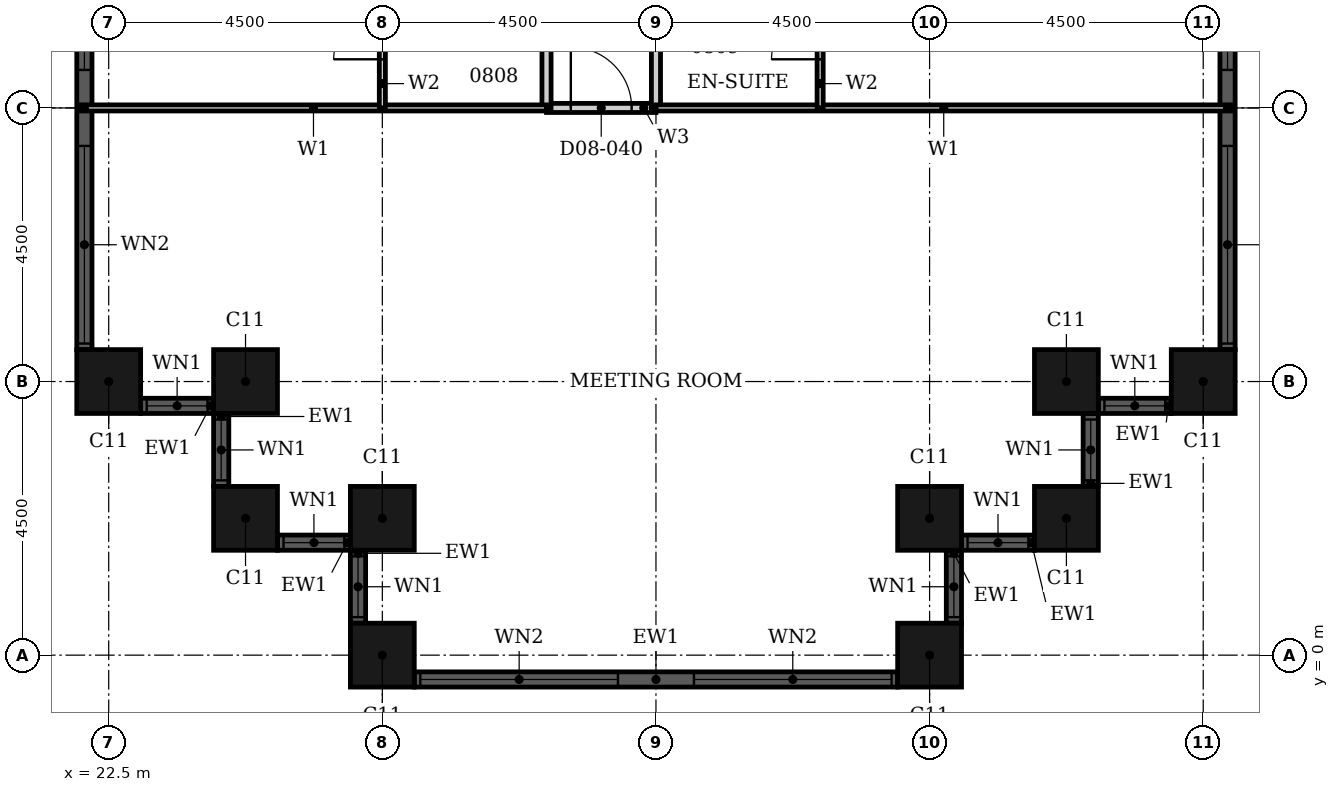
"""IFC4 building model, lengths in metres.
Left out: names, types, materials, properties, quantities, classifications, styles, units other than length and angle.
Written with IfcOpenShell. Run it as: python <this file> out.ifc"""

import sys

from ifc_helpers import new_model, si_unit, direction, frame, frame_2d, origin, origin_2d, place, context, subcontext, project, spatial, rectangle, hollow_rectangle, extrude, element, fill, save


model = new_model("IFC4")
c1 = context("Model", 3, precision=1e-05, world=origin(), true_north=direction((0.0, 1.0)))
c2 = subcontext(c1, "Body", "Model", "MODEL_VIEW")
j1 = project(units=[si_unit("LENGTHUNIT", "METRE"), si_unit("PLANEANGLEUNIT", "RADIAN")], contexts=[c1])
p1 = place(None, origin())
s1 = spatial("IfcSite", under=j1, at=p1, CompositionType="ELEMENT")
p2 = place(p1, origin())
s2 = spatial("IfcBuilding", under=s1, at=p2, CompositionType="ELEMENT")
p3 = place(p2, frame((0.0, 0.0, 40.8)))
s3 = spatial("IfcBuildingStorey", under=s2, at=p3, CompositionType="ELEMENT", Elevation=40.8)
for number, where, z_axis, x_axis in (
    (1, (22.5, 4.5, 0.0), (0.0, 0.0, 1.0), (1.0, 0.0, 0.0)),
    (2, (24.75, 4.5, 0.0), (0.0, 0.0, 1.0), (1.0, 0.0, 0.0)),
    (3, (24.75, 2.25, 0.0), (0.0, 0.0, 1.0), (1.0, 0.0, 0.0)),
    (4, (27.0, 2.25, 0.0), (0.0, 0.0, 1.0), (1.0, 0.0, 0.0)),
    (5, (27.0, 0.0, 0.0), (0.0, 0.0, 1.0), (1.0, 0.0, 0.0)),
    (6, (36.0, 0.0, 0.0), (0.0, 0.0, 1.0), (1.0, 0.0, 0.0)),
    (7, (36.0, 2.25, 0.0), (0.0, 0.0, 1.0), (1.0, 0.0, 0.0)),
    (8, (38.25, 2.25, 0.0), (0.0, 0.0, 1.0), (1.0, 0.0, 0.0)),
    (9, (38.25, 4.5, 0.0), (0.0, 0.0, 1.0), (1.0, 0.0, 0.0)),
    (10, (40.5, 4.5, 0.0), (0.0, 0.0, 1.0), (1.0, 0.0, 0.0)),
):
    element("IfcColumn", number, at=place(p3, frame(where, z_axis=z_axis, x_axis=x_axis)), inside=s3, PredefinedType="COLUMN", context=c2, shape_type="SweptSolid", body=[
        extrude(hollow_rectangle(XDim=1.05, YDim=1.05, WallThickness=0.034, at=origin_2d()), origin(), (0.0, 0.0, 1.0), 3.6),
    ])
p4 = place(p3, frame((23.025, 4.1, 0.0), z_axis=(0.0, 0.0, 1.0), x_axis=(1.0, 0.0, 0.0)))
e11 = element("IfcWall", 11, at=p4, inside=s3, PredefinedType="SOLIDWALL", context=c2, shape_type="SweptSolid", body=[
    extrude(rectangle(XDim=1.2, YDim=0.25, at=frame_2d((0.6, 0.0))), origin(), (0.0, 0.0, 1.0), 3.6),
])
p5 = place(p4, frame((0.1, 0.0, 0.9)))
e12 = element("IfcOpeningElement", 12, at=p5, cuts=e11, PredefinedType="OPENING", context=c2, shape_type="SweptSolid", body=[
    extrude(rectangle(XDim=1.0, YDim=2.08, at=frame_2d((0.5, 1.04))), frame((0.0, 0.135, 0.0), z_axis=(0.0, -1.0, 0.0), x_axis=(1.0, 0.0, 0.0)), (0.0, 0.0, 1.0), 0.27),
])
p6 = place(p3, frame((24.35, 3.975, 0.0), z_axis=(0.0, 0.0, 1.0), x_axis=(0.0, -1.0, 0.0)))
e13 = element("IfcWall", 13, at=p6, inside=s3, PredefinedType="SOLIDWALL", context=c2, shape_type="SweptSolid", body=[
    extrude(rectangle(XDim=1.2, YDim=0.25, at=frame_2d((0.6, 0.0))), origin(), (0.0, 0.0, 1.0), 3.6),
])
p7 = place(p6, frame((0.1, 0.0, 0.9)))
e14 = element("IfcOpeningElement", 14, at=p7, cuts=e13, PredefinedType="OPENING", context=c2, shape_type="SweptSolid", body=[
    extrude(rectangle(XDim=1.0, YDim=2.08, at=frame_2d((0.5, 1.04))), frame((0.0, 0.135, 0.0), z_axis=(0.0, -1.0, 0.0), x_axis=(1.0, 0.0, 0.0)), (0.0, 0.0, 1.0), 0.27),
])
p8 = place(p3, frame((25.275, 1.85, 0.0), z_axis=(0.0, 0.0, 1.0), x_axis=(1.0, 0.0, 0.0)))
e15 = element("IfcWall", 15, at=p8, inside=s3, PredefinedType="SOLIDWALL", context=c2, shape_type="SweptSolid", body=[
    extrude(rectangle(XDim=1.2, YDim=0.25, at=frame_2d((0.6, 0.0))), origin(), (0.0, 0.0, 1.0), 3.6),
])
p9 = place(p8, frame((0.1, 0.0, 0.9)))
e16 = element("IfcOpeningElement", 16, at=p9, cuts=e15, PredefinedType="OPENING", context=c2, shape_type="SweptSolid", body=[
    extrude(rectangle(XDim=1.0, YDim=2.08, at=frame_2d((0.5, 1.04))), frame((0.0, 0.135, 0.0), z_axis=(0.0, -1.0, 0.0), x_axis=(1.0, 0.0, 0.0)), (0.0, 0.0, 1.0), 0.27),
])
p10 = place(p3, frame((26.6, 1.725, 0.0), z_axis=(0.0, 0.0, 1.0), x_axis=(0.0, -1.0, 0.0)))
e17 = element("IfcWall", 17, at=p10, inside=s3, PredefinedType="SOLIDWALL", context=c2, shape_type="SweptSolid", body=[
    extrude(rectangle(XDim=1.2, YDim=0.25, at=frame_2d((0.6, 0.0))), origin(), (0.0, 0.0, 1.0), 3.6),
])
p11 = place(p10, frame((0.1, 0.0, 0.9)))
e18 = element("IfcOpeningElement", 18, at=p11, cuts=e17, PredefinedType="OPENING", context=c2, shape_type="SweptSolid", body=[
    extrude(rectangle(XDim=1.0, YDim=2.08, at=frame_2d((0.5, 1.04))), frame((0.0, 0.135, 0.0), z_axis=(0.0, -1.0, 0.0), x_axis=(1.0, 0.0, 0.0)), (0.0, 0.0, 1.0), 0.27),
])
p12 = place(p3, frame((27.525, -0.4, 0.0), z_axis=(0.0, 0.0, 1.0), x_axis=(1.0, 0.0, 0.0)))
e19 = element("IfcWall", 19, at=p12, inside=s3, PredefinedType="SOLIDWALL", context=c2, shape_type="SweptSolid", body=[
    extrude(rectangle(XDim=7.95, YDim=0.25, at=frame_2d((3.975, 0.0))), origin(), (0.0, 0.0, 1.0), 3.6),
])
p13 = place(p12, frame((0.1, 0.0, 0.9)))
e20 = element("IfcOpeningElement", 20, at=p13, cuts=e19, PredefinedType="OPENING", context=c2, shape_type="SweptSolid", body=[
    extrude(rectangle(XDim=3.25, YDim=2.08, at=frame_2d((1.625, 1.04))), frame((0.0, 0.135, 0.0), z_axis=(0.0, -1.0, 0.0), x_axis=(1.0, 0.0, 0.0)), (0.0, 0.0, 1.0), 0.27),
])
p14 = place(p12, frame((4.6, 0.0, 0.9)))
e21 = element("IfcOpeningElement", 21, at=p14, cuts=e19, PredefinedType="OPENING", context=c2, shape_type="SweptSolid", body=[
    extrude(rectangle(XDim=3.25, YDim=2.08, at=frame_2d((1.625, 1.04))), frame((0.0, 0.135, 0.0), z_axis=(0.0, -1.0, 0.0), x_axis=(1.0, 0.0, 0.0)), (0.0, 0.0, 1.0), 0.27),
])
p15 = place(p3, frame((36.4, 0.525, 0.0), z_axis=(0.0, 0.0, 1.0), x_axis=(0.0, 1.0, 0.0)))
e22 = element("IfcWall", 22, at=p15, inside=s3, PredefinedType="SOLIDWALL", context=c2, shape_type="SweptSolid", body=[
    extrude(rectangle(XDim=1.2, YDim=0.25, at=frame_2d((0.6, 0.0))), origin(), (0.0, 0.0, 1.0), 3.6),
])
p16 = place(p15, frame((0.1, 0.0, 0.9)))
e23 = element("IfcOpeningElement", 23, at=p16, cuts=e22, PredefinedType="OPENING", context=c2, shape_type="SweptSolid", body=[
    extrude(rectangle(XDim=1.0, YDim=2.08, at=frame_2d((0.5, 1.04))), frame((0.0, 0.135, 0.0), z_axis=(0.0, -1.0, 0.0), x_axis=(1.0, 0.0, 0.0)), (0.0, 0.0, 1.0), 0.27),
])
p17 = place(p3, frame((36.525, 1.85, 0.0), z_axis=(0.0, 0.0, 1.0), x_axis=(1.0, 0.0, 0.0)))
e24 = element("IfcWall", 24, at=p17, inside=s3, PredefinedType="SOLIDWALL", context=c2, shape_type="SweptSolid", body=[
    extrude(rectangle(XDim=1.2, YDim=0.25, at=frame_2d((0.6, 0.0))), origin(), (0.0, 0.0, 1.0), 3.6),
])
p18 = place(p17, frame((0.1, 0.0, 0.9)))
e25 = element("IfcOpeningElement", 25, at=p18, cuts=e24, PredefinedType="OPENING", context=c2, shape_type="SweptSolid", body=[
    extrude(rectangle(XDim=1.0, YDim=2.08, at=frame_2d((0.5, 1.04))), frame((0.0, 0.135, 0.0), z_axis=(0.0, -1.0, 0.0), x_axis=(1.0, 0.0, 0.0)), (0.0, 0.0, 1.0), 0.27),
])
p19 = place(p3, frame((38.65, 2.775, 0.0), z_axis=(0.0, 0.0, 1.0), x_axis=(0.0, 1.0, 0.0)))
e26 = element("IfcWall", 26, at=p19, inside=s3, PredefinedType="SOLIDWALL", context=c2, shape_type="SweptSolid", body=[
    extrude(rectangle(XDim=1.2, YDim=0.25, at=frame_2d((0.6, 0.0))), origin(), (0.0, 0.0, 1.0), 3.6),
])
p20 = place(p19, frame((0.1, 0.0, 0.9)))
e27 = element("IfcOpeningElement", 27, at=p20, cuts=e26, PredefinedType="OPENING", context=c2, shape_type="SweptSolid", body=[
    extrude(rectangle(XDim=1.0, YDim=2.08, at=frame_2d((0.5, 1.04))), frame((0.0, 0.135, 0.0), z_axis=(0.0, -1.0, 0.0), x_axis=(1.0, 0.0, 0.0)), (0.0, 0.0, 1.0), 0.27),
])
p21 = place(p3, frame((38.775, 4.1, 0.0), z_axis=(0.0, 0.0, 1.0), x_axis=(1.0, 0.0, 0.0)))
e28 = element("IfcWall", 28, at=p21, inside=s3, PredefinedType="SOLIDWALL", context=c2, shape_type="SweptSolid", body=[
    extrude(rectangle(XDim=1.2, YDim=0.25, at=frame_2d((0.6, 0.0))), origin(), (0.0, 0.0, 1.0), 3.6),
])
p22 = place(p21, frame((0.1, 0.0, 0.9)))
e29 = element("IfcOpeningElement", 29, at=p22, cuts=e28, PredefinedType="OPENING", context=c2, shape_type="SweptSolid", body=[
    extrude(rectangle(XDim=1.0, YDim=2.08, at=frame_2d((0.5, 1.04))), frame((0.0, 0.135, 0.0), z_axis=(0.0, -1.0, 0.0), x_axis=(1.0, 0.0, 0.0)), (0.0, 0.0, 1.0), 0.27),
])
p23 = place(p3, frame((40.9, 5.025, 0.0), z_axis=(0.0, 0.0, 1.0), x_axis=(0.0, 1.0, 0.0)))
e30 = element("IfcWall", 30, at=p23, inside=s3, PredefinedType="SOLIDWALL", context=c2, shape_type="SweptSolid", body=[
    extrude(rectangle(XDim=7.95, YDim=0.25, at=frame_2d((3.975, 0.0))), origin(), (0.0, 0.0, 1.0), 3.6),
])
p24 = place(p23, frame((0.1, 0.0, 0.9)))
e31 = element("IfcOpeningElement", 31, at=p24, cuts=e30, PredefinedType="OPENING", context=c2, shape_type="SweptSolid", body=[
    extrude(rectangle(XDim=3.25, YDim=2.08, at=frame_2d((1.625, 1.04))), frame((0.0, 0.135, 0.0), z_axis=(0.0, -1.0, 0.0), x_axis=(1.0, 0.0, 0.0)), (0.0, 0.0, 1.0), 0.27),
])
p25 = place(p23, frame((4.6, 0.0, 0.9)))
e32 = element("IfcOpeningElement", 32, at=p25, cuts=e30, PredefinedType="OPENING", context=c2, shape_type="SweptSolid", body=[
    extrude(rectangle(XDim=3.25, YDim=2.08, at=frame_2d((1.625, 1.04))), frame((0.0, 0.135, 0.0), z_axis=(0.0, -1.0, 0.0), x_axis=(1.0, 0.0, 0.0)), (0.0, 0.0, 1.0), 0.27),
])
p26 = place(p3, frame((22.1, 12.975, 0.0), z_axis=(0.0, 0.0, 1.0), x_axis=(0.0, -1.0, 0.0)))
e33 = element("IfcWall", 33, at=p26, inside=s3, PredefinedType="SOLIDWALL", context=c2, shape_type="SweptSolid", body=[
    extrude(rectangle(XDim=7.95, YDim=0.25, at=frame_2d((3.975, 0.0))), origin(), (0.0, 0.0, 1.0), 3.6),
])
p27 = place(p26, frame((0.1, 0.0, 0.9)))
e34 = element("IfcOpeningElement", 34, at=p27, cuts=e33, PredefinedType="OPENING", context=c2, shape_type="SweptSolid", body=[
    extrude(rectangle(XDim=3.25, YDim=2.08, at=frame_2d((1.625, 1.04))), frame((0.0, 0.135, 0.0), z_axis=(0.0, -1.0, 0.0), x_axis=(1.0, 0.0, 0.0)), (0.0, 0.0, 1.0), 0.27),
])
p28 = place(p26, frame((4.6, 0.0, 0.9)))
e35 = element("IfcOpeningElement", 35, at=p28, cuts=e33, PredefinedType="OPENING", context=c2, shape_type="SweptSolid", body=[
    extrude(rectangle(XDim=3.25, YDim=2.08, at=frame_2d((1.625, 1.04))), frame((0.0, 0.135, 0.0), z_axis=(0.0, -1.0, 0.0), x_axis=(1.0, 0.0, 0.0)), (0.0, 0.0, 1.0), 0.27),
])
p29 = place(p3, frame((29.7, 9.0, 0.0), z_axis=(0.0, 0.0, 1.0), x_axis=(1.0, 0.0, 0.0)))
e36 = element("IfcWall", 36, at=p29, inside=s3, PredefinedType="PARTITIONING", context=c2, shape_type="SweptSolid", body=[
    extrude(rectangle(XDim=1.8, YDim=0.15, at=frame_2d((0.9, 0.0))), origin(), (0.0, 0.0, 1.0), 3.3),
])
p30 = place(p29, frame((0.4, 0.0, 0.0)))
e37 = element("IfcOpeningElement", 37, at=p30, cuts=e36, PredefinedType="OPENING", context=c2, shape_type="SweptSolid", body=[
    extrude(rectangle(XDim=1.0, YDim=2.1, at=frame_2d((0.5, 1.05))), frame((0.0, 0.085, 0.0), z_axis=(0.0, -1.0, 0.0), x_axis=(1.0, 0.0, 0.0)), (0.0, 0.0, 1.0), 0.17),
])
p31 = place(p3, frame((29.7, 9.0, 0.0), z_axis=(0.0, 0.0, 1.0), x_axis=(0.0, 1.0, 0.0)))
e38 = element("IfcWall", 38, at=p31, inside=s3, PredefinedType="PARTITIONING", context=c2, shape_type="SweptSolid", body=[
    extrude(rectangle(XDim=4.5, YDim=0.15, at=frame_2d((2.25, 0.0))), origin(), (0.0, 0.0, 1.0), 3.3),
])
p32 = place(p31, frame((2.95, 0.0, 0.0)))
e39 = element("IfcOpeningElement", 39, at=p32, cuts=e38, PredefinedType="OPENING", context=c2, shape_type="SweptSolid", body=[
    extrude(rectangle(XDim=1.0, YDim=2.1, at=frame_2d((0.5, 1.05))), frame((0.0, 0.085, 0.0), z_axis=(0.0, -1.0, 0.0), x_axis=(1.0, 0.0, 0.0)), (0.0, 0.0, 1.0), 0.17),
])
p33 = place(p3, frame((31.5, 9.0, 0.0), z_axis=(0.0, 0.0, 1.0), x_axis=(0.0, 1.0, 0.0)))
e40 = element("IfcWall", 40, at=p33, inside=s3, PredefinedType="PARTITIONING", context=c2, shape_type="SweptSolid", body=[
    extrude(rectangle(XDim=11.7, YDim=0.15, at=frame_2d((5.85, 0.0))), origin(), (0.0, 0.0, 1.0), 2.58),
])
p34 = place(p33, frame((2.95, 0.0, 0.0)))
e41 = element("IfcOpeningElement", 41, at=p34, cuts=e40, PredefinedType="OPENING", context=c2, shape_type="SweptSolid", body=[
    extrude(rectangle(XDim=1.0, YDim=2.1, at=frame_2d((0.5, 1.05))), frame((0.0, 0.085, 0.0), z_axis=(0.0, -1.0, 0.0), x_axis=(1.0, 0.0, 0.0)), (0.0, 0.0, 1.0), 0.17),
])
p35 = place(p3, frame((31.5, 9.0, 0.0), z_axis=(0.0, 0.0, 1.0), x_axis=(1.0, 0.0, 0.0)))
e42 = element("IfcWall", 42, at=p35, inside=s3, PredefinedType="PARTITIONING", context=c2, shape_type="SweptSolid", body=[
    extrude(rectangle(XDim=9.465, YDim=0.1, at=frame_2d((4.732, 0.0))), origin(), (0.0, 0.0, 1.0), 3.3),
])
p36 = place(p3, frame((22.035, 9.0, 0.0), z_axis=(0.0, 0.0, 1.0), x_axis=(1.0, 0.0, 0.0)))
e43 = element("IfcWall", 43, at=p36, inside=s3, PredefinedType="PARTITIONING", context=c2, shape_type="SweptSolid", body=[
    extrude(rectangle(XDim=7.665, YDim=0.1, at=frame_2d((3.833, 0.0))), origin(), (0.0, 0.0, 1.0), 3.3),
])
p37 = place(p3, frame((27.0, 9.0, 0.0), z_axis=(0.0, 0.0, 1.0), x_axis=(0.0, 1.0, 0.0)))
e44 = element("IfcWall", 44, at=p37, inside=s3, PredefinedType="PARTITIONING", context=c2, shape_type="SweptSolid", body=[
    extrude(rectangle(XDim=2.4, YDim=0.1, at=frame_2d((1.2, 0.0))), origin(), (0.0, 0.0, 1.0), 2.58),
])
p38 = place(p37, frame((0.8, 0.0, 0.0)))
e45 = element("IfcOpeningElement", 45, at=p38, cuts=e44, PredefinedType="OPENING", context=c2, shape_type="SweptSolid", body=[
    extrude(rectangle(XDim=0.8, YDim=2.1, at=frame_2d((0.4, 1.05))), frame((0.0, 0.06, 0.0), z_axis=(0.0, -1.0, 0.0), x_axis=(1.0, 0.0, 0.0)), (0.0, 0.0, 1.0), 0.12),
])
p39 = place(p3, frame((34.2, 9.0, 0.0), z_axis=(0.0, 0.0, 1.0), x_axis=(0.0, 1.0, 0.0)))
e46 = element("IfcWall", 46, at=p39, inside=s3, PredefinedType="PARTITIONING", context=c2, shape_type="SweptSolid", body=[
    extrude(rectangle(XDim=2.4, YDim=0.1, at=frame_2d((1.2, 0.0))), origin(), (0.0, 0.0, 1.0), 3.3),
])
p40 = place(p39, frame((0.8, 0.0, 0.0)))
e47 = element("IfcOpeningElement", 47, at=p40, cuts=e46, PredefinedType="OPENING", context=c2, shape_type="SweptSolid", body=[
    extrude(rectangle(XDim=0.8, YDim=2.1, at=frame_2d((0.4, 1.05))), frame((0.0, 0.06, 0.0), z_axis=(0.0, -1.0, 0.0), x_axis=(1.0, 0.0, 0.0)), (0.0, 0.0, 1.0), 0.12),
])
p41 = place(p5, origin())
e48 = element("IfcWindow", 48, at=p41, inside=s3, PartitioningType="SINGLE_PANEL", PredefinedType="WINDOW", context=c2, shape_type="SweptSolid", body=[
    extrude(rectangle(XDim=1.0, YDim=2.08, at=frame_2d((0.5, 1.04))), frame((0.0, 0.03, 0.0), z_axis=(0.0, -1.0, 0.0), x_axis=(1.0, 0.0, 0.0)), (0.0, 0.0, 1.0), 0.06),
])
fill(e12, e48)
p42 = place(p7, origin())
e49 = element("IfcWindow", 49, at=p42, inside=s3, PartitioningType="SINGLE_PANEL", PredefinedType="WINDOW", context=c2, shape_type="SweptSolid", body=[
    extrude(rectangle(XDim=1.0, YDim=2.08, at=frame_2d((0.5, 1.04))), frame((0.0, 0.03, 0.0), z_axis=(0.0, -1.0, 0.0), x_axis=(1.0, 0.0, 0.0)), (0.0, 0.0, 1.0), 0.06),
])
fill(e14, e49)
p43 = place(p9, origin())
e50 = element("IfcWindow", 50, at=p43, inside=s3, PartitioningType="SINGLE_PANEL", PredefinedType="WINDOW", context=c2, shape_type="SweptSolid", body=[
    extrude(rectangle(XDim=1.0, YDim=2.08, at=frame_2d((0.5, 1.04))), frame((0.0, 0.03, 0.0), z_axis=(0.0, -1.0, 0.0), x_axis=(1.0, 0.0, 0.0)), (0.0, 0.0, 1.0), 0.06),
])
fill(e16, e50)
p44 = place(p11, origin())
e51 = element("IfcWindow", 51, at=p44, inside=s3, PartitioningType="SINGLE_PANEL", PredefinedType="WINDOW", context=c2, shape_type="SweptSolid", body=[
    extrude(rectangle(XDim=1.0, YDim=2.08, at=frame_2d((0.5, 1.04))), frame((0.0, 0.03, 0.0), z_axis=(0.0, -1.0, 0.0), x_axis=(1.0, 0.0, 0.0)), (0.0, 0.0, 1.0), 0.06),
])
fill(e18, e51)
p45 = place(p13, origin())
e52 = element("IfcWindow", 52, at=p45, inside=s3, PartitioningType="SINGLE_PANEL", PredefinedType="WINDOW", context=c2, shape_type="SweptSolid", body=[
    extrude(rectangle(XDim=3.25, YDim=2.08, at=frame_2d((1.625, 1.04))), frame((0.0, 0.03, 0.0), z_axis=(0.0, -1.0, 0.0), x_axis=(1.0, 0.0, 0.0)), (0.0, 0.0, 1.0), 0.06),
])
fill(e20, e52)
p46 = place(p14, origin())
e53 = element("IfcWindow", 53, at=p46, inside=s3, PartitioningType="SINGLE_PANEL", PredefinedType="WINDOW", context=c2, shape_type="SweptSolid", body=[
    extrude(rectangle(XDim=3.25, YDim=2.08, at=frame_2d((1.625, 1.04))), frame((0.0, 0.03, 0.0), z_axis=(0.0, -1.0, 0.0), x_axis=(1.0, 0.0, 0.0)), (0.0, 0.0, 1.0), 0.06),
])
fill(e21, e53)
p47 = place(p16, origin())
e54 = element("IfcWindow", 54, at=p47, inside=s3, PartitioningType="SINGLE_PANEL", PredefinedType="WINDOW", context=c2, shape_type="SweptSolid", body=[
    extrude(rectangle(XDim=1.0, YDim=2.08, at=frame_2d((0.5, 1.04))), frame((0.0, 0.03, 0.0), z_axis=(0.0, -1.0, 0.0), x_axis=(1.0, 0.0, 0.0)), (0.0, 0.0, 1.0), 0.06),
])
fill(e23, e54)
p48 = place(p18, origin())
e55 = element("IfcWindow", 55, at=p48, inside=s3, PartitioningType="SINGLE_PANEL", PredefinedType="WINDOW", context=c2, shape_type="SweptSolid", body=[
    extrude(rectangle(XDim=1.0, YDim=2.08, at=frame_2d((0.5, 1.04))), frame((0.0, 0.03, 0.0), z_axis=(0.0, -1.0, 0.0), x_axis=(1.0, 0.0, 0.0)), (0.0, 0.0, 1.0), 0.06),
])
fill(e25, e55)
p49 = place(p20, origin())
e56 = element("IfcWindow", 56, at=p49, inside=s3, PartitioningType="SINGLE_PANEL", PredefinedType="WINDOW", context=c2, shape_type="SweptSolid", body=[
    extrude(rectangle(XDim=1.0, YDim=2.08, at=frame_2d((0.5, 1.04))), frame((0.0, 0.03, 0.0), z_axis=(0.0, -1.0, 0.0), x_axis=(1.0, 0.0, 0.0)), (0.0, 0.0, 1.0), 0.06),
])
fill(e27, e56)
p50 = place(p22, origin())
e57 = element("IfcWindow", 57, at=p50, inside=s3, PartitioningType="SINGLE_PANEL", PredefinedType="WINDOW", context=c2, shape_type="SweptSolid", body=[
    extrude(rectangle(XDim=1.0, YDim=2.08, at=frame_2d((0.5, 1.04))), frame((0.0, 0.03, 0.0), z_axis=(0.0, -1.0, 0.0), x_axis=(1.0, 0.0, 0.0)), (0.0, 0.0, 1.0), 0.06),
])
fill(e29, e57)
p51 = place(p24, origin())
e58 = element("IfcWindow", 58, at=p51, inside=s3, PartitioningType="SINGLE_PANEL", PredefinedType="WINDOW", context=c2, shape_type="SweptSolid", body=[
    extrude(rectangle(XDim=3.25, YDim=2.08, at=frame_2d((1.625, 1.04))), frame((0.0, 0.03, 0.0), z_axis=(0.0, -1.0, 0.0), x_axis=(1.0, 0.0, 0.0)), (0.0, 0.0, 1.0), 0.06),
])
fill(e31, e58)
p52 = place(p25, origin())
e59 = element("IfcWindow", 59, at=p52, inside=s3, PartitioningType="SINGLE_PANEL", PredefinedType="WINDOW", context=c2, shape_type="SweptSolid", body=[
    extrude(rectangle(XDim=3.25, YDim=2.08, at=frame_2d((1.625, 1.04))), frame((0.0, 0.03, 0.0), z_axis=(0.0, -1.0, 0.0), x_axis=(1.0, 0.0, 0.0)), (0.0, 0.0, 1.0), 0.06),
])
fill(e32, e59)
p53 = place(p27, origin())
e60 = element("IfcWindow", 60, at=p53, inside=s3, PartitioningType="SINGLE_PANEL", PredefinedType="WINDOW", context=c2, shape_type="SweptSolid", body=[
    extrude(rectangle(XDim=3.25, YDim=2.08, at=frame_2d((1.625, 1.04))), frame((0.0, 0.03, 0.0), z_axis=(0.0, -1.0, 0.0), x_axis=(1.0, 0.0, 0.0)), (0.0, 0.0, 1.0), 0.06),
])
fill(e34, e60)
p54 = place(p28, origin())
e61 = element("IfcWindow", 61, at=p54, inside=s3, PartitioningType="SINGLE_PANEL", PredefinedType="WINDOW", context=c2, shape_type="SweptSolid", body=[
    extrude(rectangle(XDim=3.25, YDim=2.08, at=frame_2d((1.625, 1.04))), frame((0.0, 0.03, 0.0), z_axis=(0.0, -1.0, 0.0), x_axis=(1.0, 0.0, 0.0)), (0.0, 0.0, 1.0), 0.06),
])
fill(e35, e61)
p55 = place(p38, origin())
e62 = element("IfcDoor", 62, at=p55, inside=s3, OperationType="SINGLE_SWING_LEFT", PredefinedType="DOOR", context=c2, shape_type="SweptSolid", body=[
    extrude(rectangle(XDim=0.8, YDim=2.1, at=frame_2d((0.4, 1.05))), frame((0.0, 0.025, 0.0), z_axis=(0.0, -1.0, 0.0), x_axis=(1.0, 0.0, 0.0)), (0.0, 0.0, 1.0), 0.05),
])
fill(e45, e62)
p56 = place(p40, origin())
e63 = element("IfcDoor", 63, at=p56, inside=s3, OperationType="SINGLE_SWING_LEFT", PredefinedType="DOOR", context=c2, shape_type="SweptSolid", body=[
    extrude(rectangle(XDim=0.8, YDim=2.1, at=frame_2d((0.4, 1.05))), frame((0.0, 0.025, 0.0), z_axis=(0.0, -1.0, 0.0), x_axis=(1.0, 0.0, 0.0)), (0.0, 0.0, 1.0), 0.05),
])
fill(e47, e63)
p57 = place(p30, origin())
e64 = element("IfcDoor", 64, at=p57, inside=s3, OperationType="SINGLE_SWING_RIGHT", PredefinedType="DOOR", context=c2, shape_type="SweptSolid", body=[
    extrude(rectangle(XDim=1.0, YDim=2.1, at=frame_2d((0.5, 1.05))), frame((0.0, 0.025, 0.0), z_axis=(0.0, -1.0, 0.0), x_axis=(1.0, 0.0, 0.0)), (0.0, 0.0, 1.0), 0.05),
])
fill(e37, e64)
save(model, sys.argv[1])
